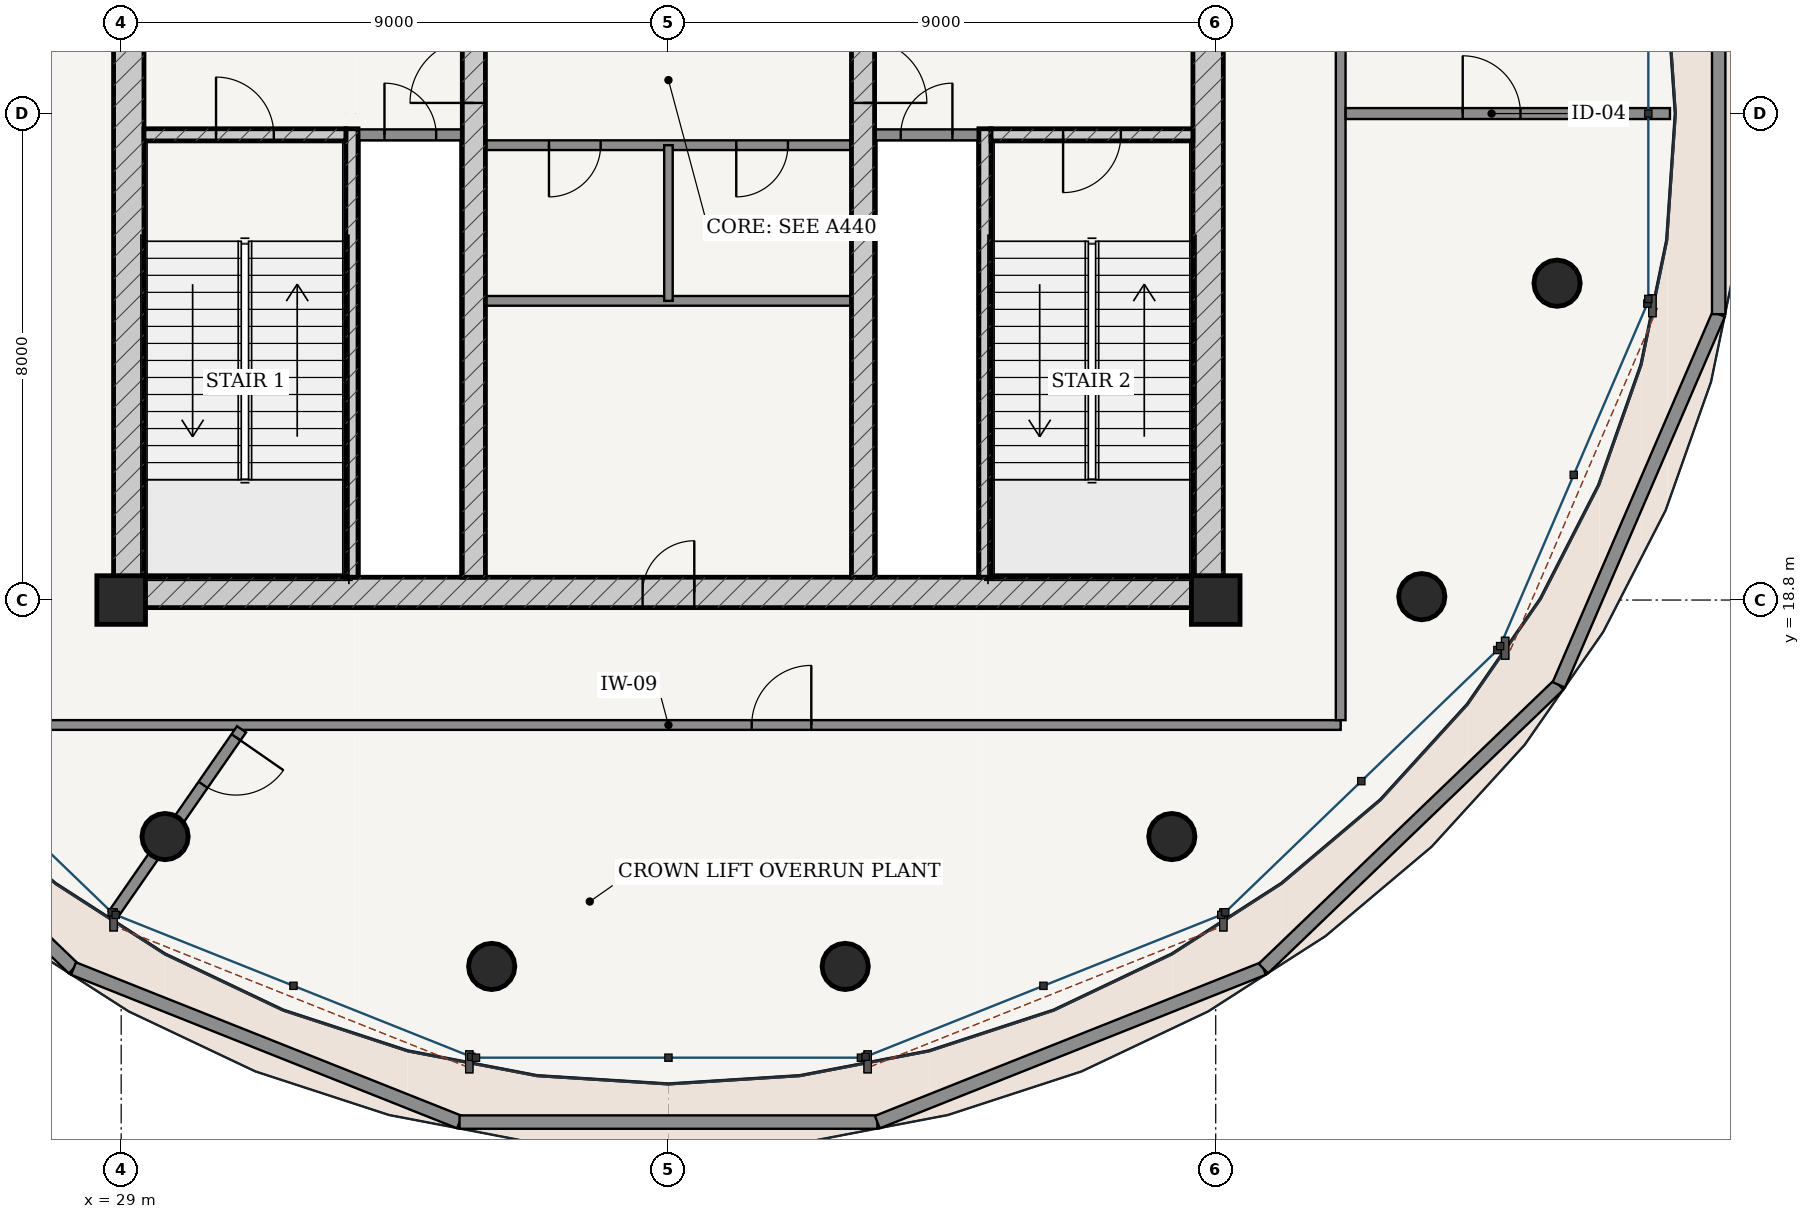
"""IFC4 building model, lengths in metres.
Left out: names, types, materials, properties, quantities, classifications, styles, units other than length and angle.
Written with IfcOpenShell. Run it as: python <this file> out.ifc"""

import sys

from ifc_helpers import new_model, si_unit, direction, frame, frame_2d, origin, origin_2d, place, context, subcontext, project, spatial, rectangle, hollow_circle, extrude, source, transform, mapped, element, fill, save


model = new_model("IFC4")
c1 = context("Model", 3, precision=1e-05, world=origin(), true_north=direction((-0.2419218956, 0.970295726276)))
c2 = subcontext(c1, "Body", "Model", "MODEL_VIEW")
j1 = project(units=[si_unit("LENGTHUNIT", "METRE"), si_unit("PLANEANGLEUNIT", "RADIAN")], contexts=[c1])
p1 = place(None, origin())
s1 = spatial("IfcSite", under=j1, at=p1, CompositionType="ELEMENT")
p2 = place(p1, origin())
s2 = spatial("IfcBuilding", under=s1, at=p2, CompositionType="ELEMENT")
p3 = place(p2, frame((0.0, 0.0, 321.7)))
s3 = spatial("IfcBuildingStorey", under=s2, at=p3, CompositionType="ELEMENT", Elevation=321.7)
for number, where, z_axis, x_axis in (
    (1, (29.0, 18.8, 0.0), (0.0, 0.0, 1.0), (1.0, 0.0, 0.0)),
    (2, (47.0, 18.8, 0.0), (0.0, 0.0, 1.0), (1.0, 0.0, 0.0)),
):
    element("IfcColumn", number, at=place(p3, frame(where, z_axis=z_axis, x_axis=x_axis)), inside=s3, PredefinedType="COLUMN", context=c2, shape_type="SweptSolid", body=[
        extrude(rectangle(XDim=0.8, YDim=0.8, at=origin_2d()), origin(), (0.0, 0.0, 1.0), 5.2),
    ])
p4 = place(p3, frame((28.875, 18.925, 0.0), z_axis=(0.0, 0.0, 1.0), x_axis=(1.0, 0.0, 0.0)))
e3 = element("IfcWall", 3, at=p4, inside=s3, PredefinedType="SHEAR", context=c2, shape_type="SweptSolid", body=[
    extrude(rectangle(XDim=18.25, YDim=0.5, at=frame_2d((9.125, 0.0))), origin(), (0.0, 0.0, 1.0), 4.78),
])
p5 = place(p4, frame((8.7, 0.0, 0.0)))
e4 = element("IfcOpeningElement", 4, at=p5, cuts=e3, PredefinedType="OPENING", context=c2, shape_type="SweptSolid", body=[
    extrude(rectangle(XDim=0.85, YDim=2.1, at=frame_2d((0.425, 1.05))), frame((0.0, 0.26, 0.0), z_axis=(0.0, -1.0, 0.0), x_axis=(1.0, 0.0, 0.0)), (0.0, 0.0, 1.0), 0.52),
])
p6 = place(p3, frame((29.125, 19.175, 0.0), z_axis=(0.0, 0.0, 1.0), x_axis=(0.0, 1.0, 0.0)))
e5 = element("IfcWall", 5, at=p6, inside=s3, PredefinedType="SHEAR", context=c2, shape_type="SweptSolid", body=[
    extrude(rectangle(XDim=15.25, YDim=0.5, at=frame_2d((7.625, 0.0))), origin(), (0.0, 0.0, 1.0), 4.78),
])
p7 = place(p6, frame((9.875, 0.0, 0.0)))
e6 = element("IfcOpeningElement", 6, at=p7, cuts=e5, PredefinedType="OPENING", context=c2, shape_type="SweptSolid", body=[
    extrude(rectangle(XDim=1.5, YDim=2.2, at=frame_2d((0.75, 1.1))), frame((0.0, 0.26, 0.0), z_axis=(0.0, -1.0, 0.0), x_axis=(1.0, 0.0, 0.0)), (0.0, 0.0, 1.0), 0.52),
])
p8 = place(p3, frame((46.875, 19.175, 0.0), z_axis=(0.0, 0.0, 1.0), x_axis=(0.0, 1.0, 0.0)))
e7 = element("IfcWall", 7, at=p8, inside=s3, PredefinedType="SHEAR", context=c2, shape_type="SweptSolid", body=[
    extrude(rectangle(XDim=15.25, YDim=0.5, at=frame_2d((7.625, 0.0))), origin(), (0.0, 0.0, 1.0), 4.78),
])
p9 = place(p8, frame((9.875, 0.0, 0.0)))
e8 = element("IfcOpeningElement", 8, at=p9, cuts=e7, PredefinedType="OPENING", context=c2, shape_type="SweptSolid", body=[
    extrude(rectangle(XDim=1.5, YDim=2.2, at=frame_2d((0.75, 1.1))), frame((0.0, 0.26, 0.0), z_axis=(0.0, -1.0, 0.0), x_axis=(1.0, 0.0, 0.0)), (0.0, 0.0, 1.0), 0.52),
])
p10 = place(p3, frame((32.795, 19.175, 0.0), z_axis=(0.0, 0.0, 1.0), x_axis=(0.0, 1.0, 0.0)))
e9 = element("IfcWall", 9, at=p10, inside=s3, PredefinedType="SOLIDWALL", context=c2, shape_type="SweptSolid", body=[
    extrude(rectangle(XDim=7.375, YDim=0.2, at=frame_2d((3.688, 0.0))), origin(), (0.0, 0.0, 1.0), 4.78),
])
p11 = place(p3, frame((29.375, 26.45, 0.0), z_axis=(0.0, 0.0, 1.0), x_axis=(1.0, 0.0, 0.0)))
e10 = element("IfcWall", 10, at=p11, inside=s3, PredefinedType="SOLIDWALL", context=c2, shape_type="SweptSolid", body=[
    extrude(rectangle(XDim=3.32, YDim=0.2, at=frame_2d((1.66, 0.0))), origin(), (0.0, 0.0, 1.0), 4.78),
])
p12 = place(p11, frame((1.185, 0.0, 0.0)))
e11 = element("IfcOpeningElement", 11, at=p12, cuts=e10, PredefinedType="OPENING", context=c2, shape_type="SweptSolid", body=[
    extrude(rectangle(XDim=0.95, YDim=2.15, at=frame_2d((0.475, 1.075))), frame((0.0, 0.11, 0.0), z_axis=(0.0, -1.0, 0.0), x_axis=(1.0, 0.0, 0.0)), (0.0, 0.0, 1.0), 0.22),
])
p13 = place(p3, frame((43.205, 19.175, 0.0), z_axis=(0.0, 0.0, 1.0), x_axis=(0.0, 1.0, 0.0)))
e12 = element("IfcWall", 12, at=p13, inside=s3, PredefinedType="SOLIDWALL", context=c2, shape_type="SweptSolid", body=[
    extrude(rectangle(XDim=7.375, YDim=0.2, at=frame_2d((3.688, 0.0))), origin(), (0.0, 0.0, 1.0), 4.78),
])
p14 = place(p3, frame((43.305, 26.45, 0.0), z_axis=(0.0, 0.0, 1.0), x_axis=(1.0, 0.0, 0.0)))
e13 = element("IfcWall", 13, at=p14, inside=s3, PredefinedType="SOLIDWALL", context=c2, shape_type="SweptSolid", body=[
    extrude(rectangle(XDim=3.32, YDim=0.2, at=frame_2d((1.66, 0.0))), origin(), (0.0, 0.0, 1.0), 4.78),
])
p15 = place(p14, frame((1.185, 0.0, 0.0)))
e14 = element("IfcOpeningElement", 14, at=p15, cuts=e13, PredefinedType="OPENING", context=c2, shape_type="SweptSolid", body=[
    extrude(rectangle(XDim=0.95, YDim=2.15, at=frame_2d((0.475, 1.075))), frame((0.0, 0.11, 0.0), z_axis=(0.0, -1.0, 0.0), x_axis=(1.0, 0.0, 0.0)), (0.0, 0.0, 1.0), 0.22),
])
p16 = place(p3, frame((34.8, 19.175, 0.0), z_axis=(0.0, 0.0, 1.0), x_axis=(0.0, 1.0, 0.0)))
e15 = element("IfcWall", 15, at=p16, inside=s3, PredefinedType="SHEAR", context=c2, shape_type="SweptSolid", body=[
    extrude(rectangle(XDim=15.25, YDim=0.38, at=frame_2d((7.625, 0.0))), origin(), (0.0, 0.0, 1.0), 4.78),
])
p17 = place(p16, frame((7.8, 0.0, 0.0)))
e16 = element("IfcOpeningElement", 16, at=p17, cuts=e15, PredefinedType="OPENING", context=c2, shape_type="SweptSolid", body=[
    extrude(rectangle(XDim=1.05, YDim=2.15, at=frame_2d((0.525, 1.075))), frame((0.0, 0.2, 0.0), z_axis=(0.0, -1.0, 0.0), x_axis=(1.0, 0.0, 0.0)), (0.0, 0.0, 1.0), 0.4),
])
p18 = place(p3, frame((41.2, 19.175, 0.0), z_axis=(0.0, 0.0, 1.0), x_axis=(0.0, 1.0, 0.0)))
e17 = element("IfcWall", 17, at=p18, inside=s3, PredefinedType="SHEAR", context=c2, shape_type="SweptSolid", body=[
    extrude(rectangle(XDim=15.25, YDim=0.38, at=frame_2d((7.625, 0.0))), origin(), (0.0, 0.0, 1.0), 4.78),
])
p19 = place(p18, frame((7.8, 0.0, 0.0)))
e18 = element("IfcOpeningElement", 18, at=p19, cuts=e17, PredefinedType="OPENING", context=c2, shape_type="SweptSolid", body=[
    extrude(rectangle(XDim=1.05, YDim=2.15, at=frame_2d((0.525, 1.075))), frame((0.0, 0.2, 0.0), z_axis=(0.0, -1.0, 0.0), x_axis=(1.0, 0.0, 0.0)), (0.0, 0.0, 1.0), 0.4),
])
for number, where, z_axis, x_axis in (
    (19, (29.722, 14.91, 0.0), (0.0, 0.0, 1.0), (1.0, 0.0, 0.0)),
    (20, (35.093, 12.775, 0.0), (0.0, 0.0, 1.0), (1.0, 0.0, 0.0)),
    (21, (40.907, 12.775, 0.0), (0.0, 0.0, 1.0), (1.0, 0.0, 0.0)),
    (22, (46.278, 14.91, 0.0), (0.0, 0.0, 1.0), (1.0, 0.0, 0.0)),
    (23, (50.389, 18.855, 0.0), (0.0, 0.0, 1.0), (1.0, 0.0, 0.0)),
    (24, (52.614, 24.01, 0.0), (0.0, 0.0, 1.0), (1.0, 0.0, 0.0)),
):
    element("IfcColumn", number, at=place(p3, frame(where, z_axis=z_axis, x_axis=x_axis)), inside=s3, PredefinedType="COLUMN", context=c2, shape_type="SweptSolid", body=[
        extrude(hollow_circle(Radius=0.381, WallThickness=0.028, at=origin_2d()), origin(), (0.0, 0.0, 1.0), 5.2),
    ])
p20 = place(p3, frame((23.358, 17.405, 0.0), z_axis=(0.0, 0.0, 1.0), x_axis=(0.721278667214, -0.69264499148, 0.0)))
e25 = element("IfcWall", 25, at=p20, inside=s3, PredefinedType="PARAPET", context=c2, shape_type="SweptSolid", body=[
    extrude(rectangle(XDim=6.736, YDim=0.22, at=frame_2d((3.368, 0.0))), origin(), (0.0, 0.0, 1.0), 1.15),
])
p21 = place(p3, frame((28.216, 12.74, 0.0), z_axis=(0.0, 0.0, 1.0), x_axis=(0.929199495848, -0.369578539576, 0.0)))
e26 = element("IfcWall", 26, at=p21, inside=s3, PredefinedType="PARAPET", context=c2, shape_type="SweptSolid", body=[
    extrude(rectangle(XDim=6.832, YDim=0.22, at=frame_2d((3.416, 0.0))), origin(), (0.0, 0.0, 1.0), 1.15),
])
p22 = place(p3, frame((34.564, 10.215, 0.0), z_axis=(0.0, 0.0, 1.0), x_axis=(1.0, 0.0, 0.0)))
e27 = element("IfcWall", 27, at=p22, inside=s3, PredefinedType="PARAPET", context=c2, shape_type="SweptSolid", body=[
    extrude(rectangle(XDim=6.871, YDim=0.22, at=frame_2d((3.436, 0.0))), origin(), (0.0, 0.0, 1.0), 1.15),
])
p23 = place(p3, frame((41.436, 10.215, 0.0), z_axis=(0.0, 0.0, 1.0), x_axis=(0.929199495848, 0.369578539576, 0.0)))
e28 = element("IfcWall", 28, at=p23, inside=s3, PredefinedType="PARAPET", context=c2, shape_type="SweptSolid", body=[
    extrude(rectangle(XDim=6.832, YDim=0.22, at=frame_2d((3.416, 0.0))), origin(), (0.0, 0.0, 1.0), 1.15),
])
p24 = place(p3, frame((47.784, 12.74, 0.0), z_axis=(0.0, 0.0, 1.0), x_axis=(0.721278667214, 0.69264499148, 0.0)))
e29 = element("IfcWall", 29, at=p24, inside=s3, PredefinedType="PARAPET", context=c2, shape_type="SweptSolid", body=[
    extrude(rectangle(XDim=6.736, YDim=0.22, at=frame_2d((3.368, 0.0))), origin(), (0.0, 0.0, 1.0), 1.15),
])
p25 = place(p3, frame((52.642, 17.405, 0.0), z_axis=(0.0, 0.0, 1.0), x_axis=(0.396106310231, 0.918204656378, 0.0)))
e30 = element("IfcWall", 30, at=p25, inside=s3, PredefinedType="PARAPET", context=c2, shape_type="SweptSolid", body=[
    extrude(rectangle(XDim=6.639, YDim=0.22, at=frame_2d((3.319, 0.0))), origin(), (0.0, 0.0, 1.0), 1.15),
])
p26 = place(p3, frame((55.272, 23.501, 0.0), z_axis=(0.0, 0.0, 1.0), x_axis=(0.0, 1.0, 0.0)))
e31 = element("IfcWall", 31, at=p26, inside=s3, PredefinedType="PARAPET", context=c2, shape_type="SweptSolid", body=[
    extrude(rectangle(XDim=6.598, YDim=0.22, at=frame_2d((3.299, 0.0))), origin(), (0.0, 0.0, 1.0), 1.15),
])
p27 = place(p3, frame((32.9, 26.45, 0.0), z_axis=(0.0, 0.0, 1.0), x_axis=(1.0, 0.0, 0.0)))
e32 = element("IfcWall", 32, at=p27, inside=s3, PredefinedType="PARTITIONING", context=c2, shape_type="SweptSolid", body=[
    extrude(rectangle(XDim=1.71, YDim=0.18, at=frame_2d((0.855, 0.0))), origin(), (0.0, 0.0, 1.0), 4.78),
])
p28 = place(p27, frame((0.43, 0.0, 0.0)))
e33 = element("IfcOpeningElement", 33, at=p28, cuts=e32, PredefinedType="OPENING", context=c2, shape_type="SweptSolid", body=[
    extrude(rectangle(XDim=0.85, YDim=2.1, at=frame_2d((0.425, 1.05))), frame((0.0, 0.1, 0.0), z_axis=(0.0, -1.0, 0.0), x_axis=(1.0, 0.0, 0.0)), (0.0, 0.0, 1.0), 0.2),
])
p29 = place(p3, frame((41.39, 26.45, 0.0), z_axis=(0.0, 0.0, 1.0), x_axis=(1.0, 0.0, 0.0)))
e34 = element("IfcWall", 34, at=p29, inside=s3, PredefinedType="PARTITIONING", context=c2, shape_type="SweptSolid", body=[
    extrude(rectangle(XDim=1.71, YDim=0.18, at=frame_2d((0.855, 0.0))), origin(), (0.0, 0.0, 1.0), 4.78),
])
p30 = place(p29, frame((0.43, 0.0, 0.0)))
e35 = element("IfcOpeningElement", 35, at=p30, cuts=e34, PredefinedType="OPENING", context=c2, shape_type="SweptSolid", body=[
    extrude(rectangle(XDim=0.85, YDim=2.1, at=frame_2d((0.425, 1.05))), frame((0.0, 0.1, 0.0), z_axis=(0.0, -1.0, 0.0), x_axis=(1.0, 0.0, 0.0)), (0.0, 0.0, 1.0), 0.2),
])
p31 = place(p3, frame((34.99, 26.28, 0.0), z_axis=(0.0, 0.0, 1.0), x_axis=(1.0, 0.0, 0.0)))
e36 = element("IfcWall", 36, at=p31, inside=s3, PredefinedType="PARTITIONING", context=c2, shape_type="SweptSolid", body=[
    extrude(rectangle(XDim=6.02, YDim=0.16, at=frame_2d((3.01, 0.0))), origin(), (0.0, 0.0, 1.0), 4.78),
])
p32 = place(p31, frame((1.045, 0.0, 0.0)))
e37 = element("IfcOpeningElement", 37, at=p32, cuts=e36, PredefinedType="OPENING", context=c2, shape_type="SweptSolid", body=[
    extrude(rectangle(XDim=0.85, YDim=2.1, at=frame_2d((0.425, 1.05))), frame((0.0, 0.09, 0.0), z_axis=(0.0, -1.0, 0.0), x_axis=(1.0, 0.0, 0.0)), (0.0, 0.0, 1.0), 0.18),
])
p33 = place(p31, frame((4.125, 0.0, 0.0)))
e38 = element("IfcOpeningElement", 38, at=p33, cuts=e36, PredefinedType="OPENING", context=c2, shape_type="SweptSolid", body=[
    extrude(rectangle(XDim=0.85, YDim=2.1, at=frame_2d((0.425, 1.05))), frame((0.0, 0.09, 0.0), z_axis=(0.0, -1.0, 0.0), x_axis=(1.0, 0.0, 0.0)), (0.0, 0.0, 1.0), 0.18),
])
p34 = place(p3, frame((34.99, 23.72, 0.0), z_axis=(0.0, 0.0, 1.0), x_axis=(1.0, 0.0, 0.0)))
e39 = element("IfcWall", 39, at=p34, inside=s3, PredefinedType="PARTITIONING", context=c2, shape_type="SweptSolid", body=[
    extrude(rectangle(XDim=6.02, YDim=0.16, at=frame_2d((3.01, 0.0))), origin(), (0.0, 0.0, 1.0), 4.78),
])
p35 = place(p3, frame((38.0, 23.72, 0.0), z_axis=(0.0, 0.0, 1.0), x_axis=(0.0, 1.0, 0.0)))
e40 = element("IfcWall", 40, at=p35, inside=s3, PredefinedType="PARTITIONING", context=c2, shape_type="SweptSolid", body=[
    extrude(rectangle(XDim=2.56, YDim=0.14, at=frame_2d((1.28, 0.0))), origin(), (0.0, 0.0, 1.0), 4.78),
])
p36 = place(p3, frame((26.945, 16.745, 0.0), z_axis=(0.0, 0.0, 1.0), x_axis=(1.0, 0.0, 0.0)))
e41 = element("IfcWall", 41, at=p36, inside=s3, PredefinedType="PARTITIONING", context=c2, shape_type="SweptSolid", body=[
    extrude(rectangle(XDim=22.11, YDim=0.16, at=frame_2d((11.055, 0.0))), origin(), (0.0, 0.0, 1.0), 4.352),
])
p37 = place(p36, frame((12.424, 0.0, 0.0)))
e42 = element("IfcOpeningElement", 42, at=p37, cuts=e41, PredefinedType="OPENING", context=c2, shape_type="SweptSolid", body=[
    extrude(rectangle(XDim=0.98, YDim=2.2, at=frame_2d((0.49, 1.1))), frame((0.0, 0.09, 0.0), z_axis=(0.0, -1.0, 0.0), x_axis=(1.0, 0.0, 0.0)), (0.0, 0.0, 1.0), 0.18),
])
p38 = place(p3, frame((49.055, 16.825, 0.0), z_axis=(0.0, 0.0, 1.0), x_axis=(0.0, 1.0, 0.0)))
e43 = element("IfcWall", 43, at=p38, inside=s3, PredefinedType="PARTITIONING", context=c2, shape_type="SweptSolid", body=[
    extrude(rectangle(XDim=19.95, YDim=0.16, at=frame_2d((9.975, 0.0))), origin(), (0.0, 0.0, 1.0), 4.352),
])
p39 = place(p3, frame((49.137, 26.8, 0.0), z_axis=(0.0, 0.0, 1.0), x_axis=(1.0, 0.0, 0.0)))
e44 = element("IfcWall", 44, at=p39, inside=s3, PredefinedType="PARTITIONING", context=c2, shape_type="SweptSolid", body=[
    extrude(rectangle(XDim=5.333, YDim=0.18, at=frame_2d((2.667, 0.0))), origin(), (0.0, 0.0, 1.0), 4.411),
])
p40 = place(p39, frame((1.925, 0.0, 0.0)))
e45 = element("IfcOpeningElement", 45, at=p40, cuts=e44, PredefinedType="OPENING", context=c2, shape_type="SweptSolid", body=[
    extrude(rectangle(XDim=0.95, YDim=2.15, at=frame_2d((0.475, 1.075))), frame((0.0, 0.1, 0.0), z_axis=(0.0, -1.0, 0.0), x_axis=(1.0, 0.0, 0.0)), (0.0, 0.0, 1.0), 0.2),
])
p41 = place(p3, frame((30.979, 16.674, 0.0), z_axis=(0.0, 0.0, 1.0), x_axis=(-0.569738046405, -0.82182635543, 0.0)))
e46 = element("IfcWall", 46, at=p41, inside=s3, PredefinedType="PARTITIONING", context=c2, shape_type="SweptSolid", body=[
    extrude(rectangle(XDim=3.701, YDim=0.18, at=frame_2d((1.851, 0.0))), origin(), (0.0, 0.0, 1.0), 4.352),
])
p42 = place(p41, frame((0.16, 0.0, 0.0)))
e47 = element("IfcOpeningElement", 47, at=p42, cuts=e46, PredefinedType="OPENING", context=c2, shape_type="SweptSolid", body=[
    extrude(rectangle(XDim=0.95, YDim=2.15, at=frame_2d((0.475, 1.075))), frame((0.0, 0.1, 0.0), z_axis=(0.0, -1.0, 0.0), x_axis=(1.0, 0.0, 0.0)), (0.0, 0.0, 1.0), 0.2),
])
m1 = source(origin(), c2, "Body", "SweptSolid", [
    extrude(rectangle(XDim=1.05, YDim=2.15, at=frame_2d((0.525, 1.075))), frame((0.0, 0.025, 0.0), z_axis=(0.0, -1.0, 0.0), x_axis=(1.0, 0.0, 0.0)), (0.0, 0.0, 1.0), 0.05),
])
p43 = place(p17, origin())
e48 = element("IfcDoor", 48, at=p43, inside=s3, OperationType="SINGLE_SWING_LEFT", PredefinedType="DOOR", context=c2, shape_type="MappedRepresentation", body=[
    mapped(m1, transform((0.0, 0.0, 0.0), scale=1.0)),
])
fill(e16, e48)
p44 = place(p19, frame((1.05, 0.0, 0.0), z_axis=(0.0, 0.0, 1.0), x_axis=(-1.0, 0.0, 0.0)))
e49 = element("IfcDoor", 49, at=p44, inside=s3, OperationType="SINGLE_SWING_RIGHT", PredefinedType="DOOR", context=c2, shape_type="MappedRepresentation", body=[
    mapped(m1, transform((0.0, 0.0, 0.0), scale=1.0)),
])
fill(e18, e49)
m2 = source(origin(), c2, "Body", "SweptSolid", [
    extrude(rectangle(XDim=0.95, YDim=2.15, at=frame_2d((0.475, 1.075))), frame((0.0, 0.025, 0.0), z_axis=(0.0, -1.0, 0.0), x_axis=(1.0, 0.0, 0.0)), (0.0, 0.0, 1.0), 0.05),
])
p45 = place(p12, origin())
e50 = element("IfcDoor", 50, at=p45, inside=s3, OperationType="SINGLE_SWING_LEFT", PredefinedType="DOOR", context=c2, shape_type="MappedRepresentation", body=[
    mapped(m2, transform((0.0, 0.0, 0.0), scale=1.0)),
])
fill(e11, e50)
p46 = place(p15, frame((0.95, 0.0, 0.0), z_axis=(0.0, 0.0, 1.0), x_axis=(-1.0, 0.0, 0.0)))
e51 = element("IfcDoor", 51, at=p46, inside=s3, OperationType="SINGLE_SWING_RIGHT", PredefinedType="DOOR", context=c2, shape_type="MappedRepresentation", body=[
    mapped(m2, transform((0.0, 0.0, 0.0), scale=1.0)),
])
fill(e14, e51)
m3 = source(origin(), c2, "Body", "SweptSolid", [
    extrude(rectangle(XDim=0.85, YDim=2.1, at=frame_2d((0.425, 1.05))), frame((0.0, 0.025, 0.0), z_axis=(0.0, -1.0, 0.0), x_axis=(1.0, 0.0, 0.0)), (0.0, 0.0, 1.0), 0.05),
])
p47 = place(p28, origin())
e52 = element("IfcDoor", 52, at=p47, inside=s3, OperationType="SINGLE_SWING_LEFT", PredefinedType="DOOR", context=c2, shape_type="MappedRepresentation", body=[
    mapped(m3, transform((0.0, 0.0, 0.0), scale=1.0)),
])
fill(e33, e52)
p48 = place(p30, origin())
e53 = element("IfcDoor", 53, at=p48, inside=s3, OperationType="SINGLE_SWING_RIGHT", PredefinedType="DOOR", context=c2, shape_type="MappedRepresentation", body=[
    mapped(m3, transform((0.0, 0.0, 0.0), scale=1.0)),
])
fill(e35, e53)
p49 = place(p32, frame((0.85, 0.0, 0.0), z_axis=(0.0, 0.0, 1.0), x_axis=(-1.0, 0.0, 0.0)))
e54 = element("IfcDoor", 54, at=p49, inside=s3, OperationType="SINGLE_SWING_RIGHT", PredefinedType="DOOR", context=c2, shape_type="MappedRepresentation", body=[
    mapped(m3, transform((0.0, 0.0, 0.0), scale=1.0)),
])
fill(e37, e54)
p50 = place(p33, frame((0.85, 0.0, 0.0), z_axis=(0.0, 0.0, 1.0), x_axis=(-1.0, 0.0, 0.0)))
e55 = element("IfcDoor", 55, at=p50, inside=s3, OperationType="SINGLE_SWING_RIGHT", PredefinedType="DOOR", context=c2, shape_type="MappedRepresentation", body=[
    mapped(m3, transform((0.0, 0.0, 0.0), scale=1.0)),
])
fill(e38, e55)
p51 = place(p5, origin())
e56 = element("IfcDoor", 56, at=p51, inside=s3, OperationType="SINGLE_SWING_RIGHT", PredefinedType="DOOR", context=c2, shape_type="MappedRepresentation", body=[
    mapped(m3, transform((0.0, 0.0, 0.0), scale=1.0)),
])
fill(e4, e56)
m4 = source(origin(), c2, "Body", "SweptSolid", [
    extrude(rectangle(XDim=0.98, YDim=2.2, at=frame_2d((0.49, 1.1))), frame((0.0, 0.025, 0.0), z_axis=(0.0, -1.0, 0.0), x_axis=(1.0, 0.0, 0.0)), (0.0, 0.0, 1.0), 0.05),
])
p52 = place(p37, origin())
e57 = element("IfcDoor", 57, at=p52, inside=s3, OperationType="SINGLE_SWING_RIGHT", PredefinedType="DOOR", context=c2, shape_type="MappedRepresentation", body=[
    mapped(m4, transform((0.0, 0.0, 0.0), scale=1.0)),
])
fill(e42, e57)
p53 = place(p40, origin())
e58 = element("IfcDoor", 58, at=p53, inside=s3, OperationType="SINGLE_SWING_LEFT", PredefinedType="DOOR", context=c2, shape_type="MappedRepresentation", body=[
    mapped(m2, transform((0.0, 0.0, 0.0), scale=1.0)),
])
fill(e45, e58)
p54 = place(p42, origin())
e59 = element("IfcDoor", 59, at=p54, inside=s3, OperationType="SINGLE_SWING_LEFT", PredefinedType="DOOR", context=c2, shape_type="MappedRepresentation", body=[
    mapped(m2, transform((0.0, 0.0, 0.0), scale=1.0)),
])
fill(e47, e59)
save(model, sys.argv[1])
